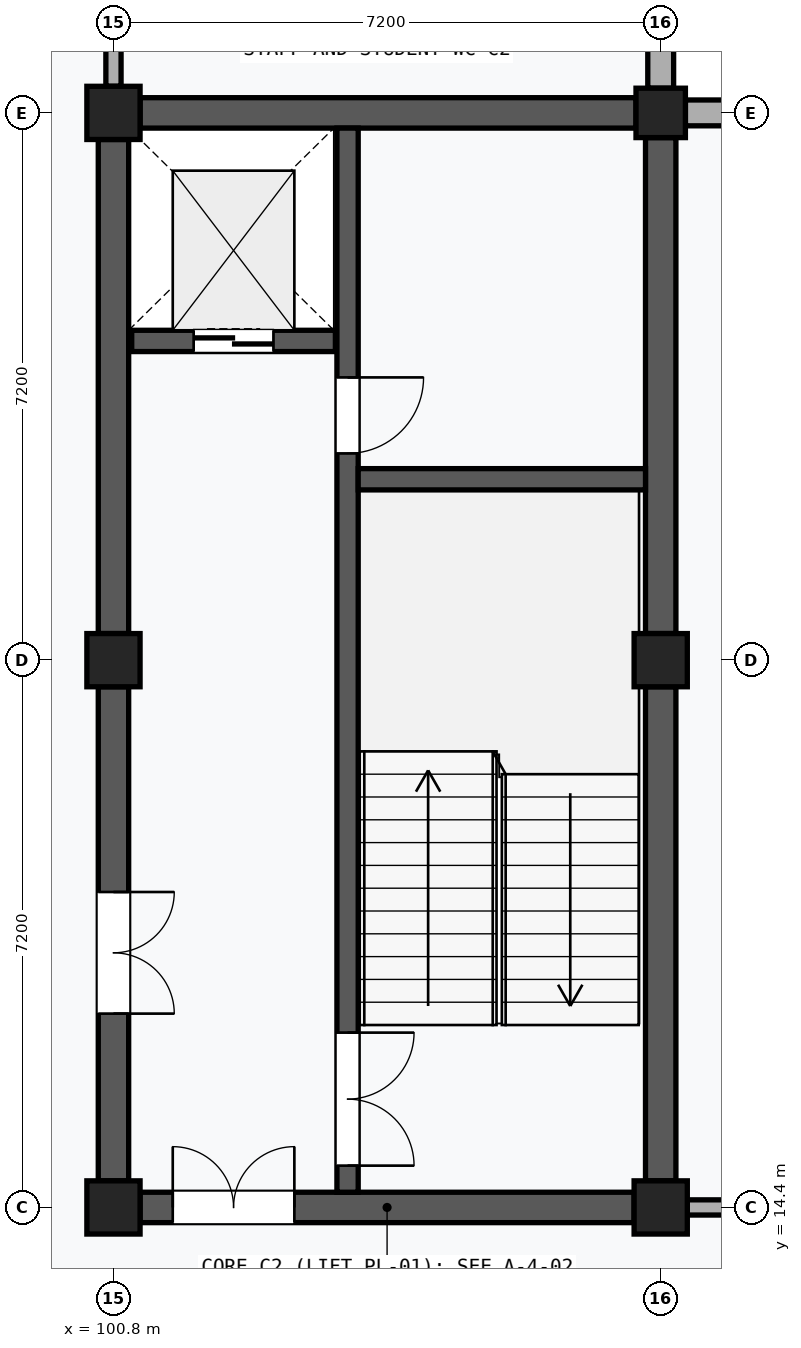
"""IFC4 building model, lengths in metres.
Left out: names, types, materials, properties, quantities, classifications, styles, units other than length and angle.
Written with IfcOpenShell. Run it as: python <this file> out.ifc"""

import sys

from ifc_helpers import new_model, si_unit, direction, frame, frame_2d, origin, origin_2d, place, context, subcontext, project, spatial, rectangle, extrude, element, fill, save


model = new_model("IFC4")
c1 = context("Model", 3, precision=1e-05, world=origin(), true_north=direction((0.0, 1.0)))
c2 = subcontext(c1, "Body", "Model", "MODEL_VIEW")
j1 = project(units=[si_unit("LENGTHUNIT", "METRE"), si_unit("PLANEANGLEUNIT", "RADIAN")], contexts=[c1])
p1 = place(None, origin())
s1 = spatial("IfcSite", under=j1, at=p1, CompositionType="ELEMENT")
p2 = place(p1, origin())
s2 = spatial("IfcBuilding", under=s1, at=p2, CompositionType="ELEMENT")
p3 = place(p2, frame((0.0, 0.0, 22.6)))
s3 = spatial("IfcBuildingStorey", under=s2, at=p3, CompositionType="ELEMENT", Elevation=22.6)
for number, where, z_axis, x_axis in (
    (1, (100.8, 14.4, 0.0), (0.0, 0.0, 1.0), (1.0, 0.0, 0.0)),
    (2, (100.8, 21.6, 0.0), (0.0, 0.0, 1.0), (1.0, 0.0, 0.0)),
    (3, (100.8, 28.8, 0.0), (0.0, 0.0, 1.0), (1.0, 0.0, 0.0)),
    (4, (108.0, 14.4, 0.0), (0.0, 0.0, 1.0), (1.0, 0.0, 0.0)),
    (5, (108.0, 21.6, 0.0), (0.0, 0.0, 1.0), (1.0, 0.0, 0.0)),
):
    element("IfcColumn", number, at=place(p3, frame(where, z_axis=z_axis, x_axis=x_axis)), inside=s3, PredefinedType="COLUMN", context=c2, shape_type="SweptSolid", body=[
        extrude(rectangle(XDim=0.7, YDim=0.7, at=origin_2d()), origin(), (0.0, 0.0, 1.0), 4.0),
    ])
p4 = place(p3, frame((108.0, 28.8, 0.0), z_axis=(0.0, 0.0, 1.0), x_axis=(1.0, 0.0, 0.0)))
e6 = element("IfcColumn", 6, at=p4, inside=s3, PredefinedType="COLUMN", context=c2, shape_type="SweptSolid", body=[
    extrude(rectangle(XDim=0.65, YDim=0.65, at=origin_2d()), origin(), (0.0, 0.0, 1.0), 4.0),
])
p5 = place(p3, frame((108.0, 29.125, 0.0), z_axis=(0.0, 0.0, 1.0), x_axis=(0.0, 1.0, 0.0)))
e7 = element("IfcWall", 7, at=p5, inside=s3, PredefinedType="SOLIDWALL", context=c2, shape_type="SweptSolid", body=[
    extrude(rectangle(XDim=6.5, YDim=0.34, at=frame_2d((3.25, 0.0))), origin(), (0.0, 0.0, 1.0), 3.12),
])
p6 = place(p5, frame((2.5, 0.0, 1.1)))
e8 = element("IfcOpeningElement", 8, at=p6, cuts=e7, PredefinedType="OPENING", context=c2, shape_type="SweptSolid", body=[
    extrude(rectangle(XDim=1.5, YDim=1.35, at=frame_2d((0.75, 0.675))), frame((0.0, 0.182, 0.0), z_axis=(0.0, -1.0, 0.0), x_axis=(1.0, 0.0, 0.0)), (0.0, 0.0, 1.0), 0.364),
])
p7 = place(p3, frame((108.325, 28.8, 0.0), z_axis=(0.0, 0.0, 1.0), x_axis=(1.0, 0.0, 0.0)))
e9 = element("IfcWall", 9, at=p7, inside=s3, PredefinedType="SOLIDWALL", context=c2, shape_type="SweptSolid", body=[
    extrude(rectangle(XDim=6.625, YDim=0.34, at=frame_2d((3.312, 0.0))), origin(), (0.0, 0.0, 1.0), 3.12),
])
p8 = place(p7, frame((2.562, 0.0, 1.1)))
e10 = element("IfcOpeningElement", 10, at=p8, cuts=e9, PredefinedType="OPENING", context=c2, shape_type="SweptSolid", body=[
    extrude(rectangle(XDim=1.5, YDim=1.35, at=frame_2d((0.75, 0.675))), frame((0.0, 0.182, 0.0), z_axis=(0.0, -1.0, 0.0), x_axis=(1.0, 0.0, 0.0)), (0.0, 0.0, 1.0), 0.364),
])
p9 = place(p3, frame((100.8, 14.75, 0.0), z_axis=(0.0, 0.0, 1.0), x_axis=(0.0, 1.0, 0.0)))
e11 = element("IfcWall", 11, at=p9, inside=s3, PredefinedType="SHEAR", context=c2, shape_type="SweptSolid", body=[
    extrude(rectangle(XDim=6.5, YDim=0.4, at=frame_2d((3.25, 0.0))), origin(), (0.0, 0.0, 1.0), 2.98),
])
p10 = place(p9, frame((2.2, 0.0, 0.0)))
e12 = element("IfcOpeningElement", 12, at=p10, cuts=e11, PredefinedType="OPENING", context=c2, shape_type="SweptSolid", body=[
    extrude(rectangle(XDim=1.6, YDim=2.2, at=frame_2d((0.8, 1.1))), frame((0.0, 0.212, 0.0), z_axis=(0.0, -1.0, 0.0), x_axis=(1.0, 0.0, 0.0)), (0.0, 0.0, 1.0), 0.424),
])
for number, where, z_axis, x_axis in (
    (13, (100.8, 21.95, 0.0), (0.0, 0.0, 1.0), (0.0, 1.0, 0.0)),
    (14, (108.0, 14.75, 0.0), (0.0, 0.0, 1.0), (0.0, 1.0, 0.0)),
):
    element("IfcWall", number, at=place(p3, frame(where, z_axis=z_axis, x_axis=x_axis)), inside=s3, PredefinedType="SHEAR", context=c2, shape_type="SweptSolid", body=[
        extrude(rectangle(XDim=6.5, YDim=0.4, at=frame_2d((3.25, 0.0))), origin(), (0.0, 0.0, 1.0), 2.98),
    ])
p11 = place(p3, frame((108.0, 21.95, 0.0), z_axis=(0.0, 0.0, 1.0), x_axis=(0.0, 1.0, 0.0)))
e15 = element("IfcWall", 15, at=p11, inside=s3, PredefinedType="SHEAR", context=c2, shape_type="SweptSolid", body=[
    extrude(rectangle(XDim=6.525, YDim=0.4, at=frame_2d((3.263, 0.0))), origin(), (0.0, 0.0, 1.0), 2.98),
])
p12 = place(p3, frame((101.15, 14.4, 0.0), z_axis=(0.0, 0.0, 1.0), x_axis=(1.0, 0.0, 0.0)))
e16 = element("IfcWall", 16, at=p12, inside=s3, PredefinedType="SHEAR", context=c2, shape_type="SweptSolid", body=[
    extrude(rectangle(XDim=6.5, YDim=0.4, at=frame_2d((3.25, 0.0))), origin(), (0.0, 0.0, 1.0), 3.05),
])
p13 = place(p12, frame((0.43, 0.0, 0.0)))
e17 = element("IfcOpeningElement", 17, at=p13, cuts=e16, PredefinedType="OPENING", context=c2, shape_type="SweptSolid", body=[
    extrude(rectangle(XDim=1.6, YDim=2.2, at=frame_2d((0.8, 1.1))), frame((0.0, 0.212, 0.0), z_axis=(0.0, -1.0, 0.0), x_axis=(1.0, 0.0, 0.0)), (0.0, 0.0, 1.0), 0.424),
])
p14 = place(p3, frame((101.15, 28.8, 0.0), z_axis=(0.0, 0.0, 1.0), x_axis=(1.0, 0.0, 0.0)))
e18 = element("IfcWall", 18, at=p14, inside=s3, PredefinedType="SHEAR", context=c2, shape_type="SweptSolid", body=[
    extrude(rectangle(XDim=6.525, YDim=0.4, at=frame_2d((3.263, 0.0))), origin(), (0.0, 0.0, 1.0), 2.98),
])
p15 = place(p3, frame((103.88, 14.6, 0.0), z_axis=(0.0, 0.0, 1.0), x_axis=(0.0, 1.0, 0.0)))
e19 = element("IfcWall", 19, at=p15, inside=s3, PredefinedType="SHEAR", context=c2, shape_type="SweptSolid", body=[
    extrude(rectangle(XDim=14.0, YDim=0.28, at=frame_2d((7.0, 0.0))), origin(), (0.0, 0.0, 1.0), 3.75),
])
p16 = place(p15, frame((0.35, 0.0, 0.0)))
e20 = element("IfcOpeningElement", 20, at=p16, cuts=e19, PredefinedType="OPENING", context=c2, shape_type="SweptSolid", body=[
    extrude(rectangle(XDim=1.75, YDim=2.15, at=frame_2d((0.875, 1.075))), frame((0.0, 0.152, 0.0), z_axis=(0.0, -1.0, 0.0), x_axis=(1.0, 0.0, 0.0)), (0.0, 0.0, 1.0), 0.304),
])
p17 = place(p15, frame((9.72, 0.0, 0.0)))
e21 = element("IfcOpeningElement", 21, at=p17, cuts=e19, PredefinedType="OPENING", context=c2, shape_type="SweptSolid", body=[
    extrude(rectangle(XDim=1.0, YDim=2.15, at=frame_2d((0.5, 1.075))), frame((0.0, 0.152, 0.0), z_axis=(0.0, -1.0, 0.0), x_axis=(1.0, 0.0, 0.0)), (0.0, 0.0, 1.0), 0.304),
])
p18 = place(p3, frame((104.02, 23.98, 0.0), z_axis=(0.0, 0.0, 1.0), x_axis=(1.0, 0.0, 0.0)))
e22 = element("IfcWall", 22, at=p18, inside=s3, PredefinedType="SHEAR", context=c2, shape_type="SweptSolid", body=[
    extrude(rectangle(XDim=3.78, YDim=0.28, at=frame_2d((1.89, 0.0))), origin(), (0.0, 0.0, 1.0), 3.75),
])
p19 = place(p3, frame((101.04, 25.8, 0.0), z_axis=(0.0, 0.0, 1.0), x_axis=(1.0, 0.0, 0.0)))
e23 = element("IfcWall", 23, at=p19, inside=s3, PredefinedType="SHEAR", context=c2, shape_type="SweptSolid", body=[
    extrude(rectangle(XDim=2.68, YDim=0.28, at=frame_2d((1.34, 0.0))), origin(), (0.0, 0.0, 1.0), 3.75),
])
p20 = place(p19, frame((0.815, 0.0, 0.0)))
e24 = element("IfcOpeningElement", 24, at=p20, cuts=e23, PredefinedType="OPENING", context=c2, shape_type="SweptSolid", body=[
    extrude(rectangle(XDim=1.05, YDim=2.2, at=frame_2d((0.525, 1.1))), frame((0.0, 0.152, 0.0), z_axis=(0.0, -1.0, 0.0), x_axis=(1.0, 0.0, 0.0)), (0.0, 0.0, 1.0), 0.304),
])
p21 = place(p3, frame((108.35, 14.4, 0.0), z_axis=(0.0, 0.0, 1.0), x_axis=(1.0, 0.0, 0.0)))
e25 = element("IfcWall", 25, at=p21, inside=s3, PredefinedType="PARTITIONING", context=c2, shape_type="SweptSolid", body=[
    extrude(rectangle(XDim=6.5, YDim=0.2, at=frame_2d((3.25, 0.0))), origin(), (0.0, 0.0, 1.0), 2.98),
])
p22 = place(p21, frame((2.74, 0.0, 0.0)))
e26 = element("IfcOpeningElement", 26, at=p22, cuts=e25, PredefinedType="OPENING", context=c2, shape_type="SweptSolid", body=[
    extrude(rectangle(XDim=1.02, YDim=2.12, at=frame_2d((0.51, 1.06))), frame((0.0, 0.112, 0.0), z_axis=(0.0, -1.0, 0.0), x_axis=(1.0, 0.0, 0.0)), (0.0, 0.0, 1.0), 0.224),
])
p23 = place(p3, frame((100.8, 29.15, 0.0), z_axis=(0.0, 0.0, 1.0), x_axis=(0.0, 1.0, 0.0)))
e27 = element("IfcWall", 27, at=p23, inside=s3, PredefinedType="PARTITIONING", context=c2, shape_type="SweptSolid", body=[
    extrude(rectangle(XDim=6.5, YDim=0.2, at=frame_2d((3.25, 0.0))), origin(), (0.0, 0.0, 1.0), 2.98),
])
p24 = place(p23, frame((2.65, 0.0, 0.0)))
e28 = element("IfcOpeningElement", 28, at=p24, cuts=e27, PredefinedType="OPENING", context=c2, shape_type="SweptSolid", body=[
    extrude(rectangle(XDim=1.2, YDim=2.24, at=frame_2d((0.6, 1.12))), frame((0.0, 0.112, 0.0), z_axis=(0.0, -1.0, 0.0), x_axis=(1.0, 0.0, 0.0)), (0.0, 0.0, 1.0), 0.224),
])
p25 = place(p10, frame((1.6, 0.0, 0.0), z_axis=(0.0, 0.0, 1.0), x_axis=(-1.0, 0.0, 0.0)))
e29 = element("IfcDoor", 29, at=p25, inside=s3, OperationType="DOUBLE_DOOR_SINGLE_SWING", PredefinedType="DOOR", context=c2, shape_type="SweptSolid", body=[
    extrude(rectangle(XDim=1.6, YDim=2.2, at=frame_2d((0.8, 1.1))), frame((0.0, 0.025, 0.0), z_axis=(0.0, -1.0, 0.0), x_axis=(1.0, 0.0, 0.0)), (0.0, 0.0, 1.0), 0.05),
])
fill(e12, e29)
p26 = place(p13, origin())
e30 = element("IfcDoor", 30, at=p26, inside=s3, OperationType="DOUBLE_DOOR_SINGLE_SWING", PredefinedType="DOOR", context=c2, shape_type="SweptSolid", body=[
    extrude(rectangle(XDim=1.6, YDim=2.2, at=frame_2d((0.8, 1.1))), frame((0.0, 0.025, 0.0), z_axis=(0.0, -1.0, 0.0), x_axis=(1.0, 0.0, 0.0)), (0.0, 0.0, 1.0), 0.05),
])
fill(e17, e30)
p27 = place(p16, frame((1.75, 0.0, 0.0), z_axis=(0.0, 0.0, 1.0), x_axis=(-1.0, 0.0, 0.0)))
e31 = element("IfcDoor", 31, at=p27, inside=s3, OperationType="DOUBLE_DOOR_SINGLE_SWING", PredefinedType="DOOR", context=c2, shape_type="SweptSolid", body=[
    extrude(rectangle(XDim=1.75, YDim=2.15, at=frame_2d((0.875, 1.075))), frame((0.0, 0.025, 0.0), z_axis=(0.0, -1.0, 0.0), x_axis=(1.0, 0.0, 0.0)), (0.0, 0.0, 1.0), 0.05),
])
fill(e20, e31)
p28 = place(p17, frame((1.0, 0.0, 0.0), z_axis=(0.0, 0.0, 1.0), x_axis=(-1.0, 0.0, 0.0)))
e32 = element("IfcDoor", 32, at=p28, inside=s3, OperationType="SINGLE_SWING_LEFT", PredefinedType="DOOR", context=c2, shape_type="SweptSolid", body=[
    extrude(rectangle(XDim=1.0, YDim=2.15, at=frame_2d((0.5, 1.075))), frame((0.0, 0.025, 0.0), z_axis=(0.0, -1.0, 0.0), x_axis=(1.0, 0.0, 0.0)), (0.0, 0.0, 1.0), 0.05),
])
fill(e21, e32)
p29 = place(p20, frame((1.05, 0.0, 0.0), z_axis=(0.0, 0.0, 1.0), x_axis=(-1.0, 0.0, 0.0)))
e33 = element("IfcDoor", 33, at=p29, inside=s3, OperationType="DOUBLE_DOOR_SLIDING", PredefinedType="DOOR", context=c2, shape_type="SweptSolid", body=[
    extrude(rectangle(XDim=1.05, YDim=2.2, at=frame_2d((0.525, 1.1))), frame((0.0, 0.025, 0.0), z_axis=(0.0, -1.0, 0.0), x_axis=(1.0, 0.0, 0.0)), (0.0, 0.0, 1.0), 0.05),
])
fill(e24, e33)
save(model, sys.argv[1])
